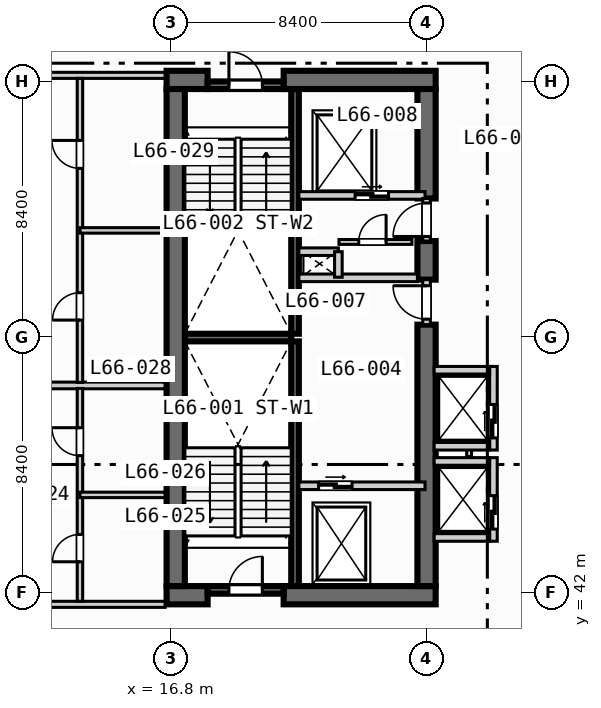
"""IFC4 building model, lengths in metres.
Left out: names, types, materials, properties, quantities, classifications, styles, units other than length and angle.
Written with IfcOpenShell. Run it as: python <this file> out.ifc"""

import sys

from ifc_helpers import new_model, si_unit, direction, frame, frame_2d, origin, place, context, subcontext, project, spatial, rectangle, extrude, element, fill, save


model = new_model("IFC4")
c1 = context("Model", 3, precision=1e-05, world=origin(), true_north=direction((0.0, 1.0)))
c2 = subcontext(c1, "Body", "Model", "MODEL_VIEW")
j1 = project(units=[si_unit("LENGTHUNIT", "METRE"), si_unit("PLANEANGLEUNIT", "RADIAN")], contexts=[c1])
p1 = place(None, origin())
s1 = spatial("IfcSite", under=j1, at=p1, CompositionType="ELEMENT")
p2 = place(p1, origin())
s2 = spatial("IfcBuilding", under=s1, at=p2, CompositionType="ELEMENT")
p3 = place(p2, frame((0.0, 0.0, 267.5)))
s3 = spatial("IfcBuildingStorey", under=s2, at=p3, CompositionType="ELEMENT", Elevation=267.5)
for number, where, z_axis, x_axis in (
    (1, (20.875, 42.2, 0.0), (0.0, 0.0, 1.0), (0.0, 1.0, 0.0)),
    (2, (20.875, 50.5, 0.0), (0.0, 0.0, 1.0), (0.0, 1.0, 0.0)),
):
    element("IfcWall", number, at=place(p3, frame(where, z_axis=z_axis, x_axis=x_axis)), inside=s3, PredefinedType="SOLIDWALL", context=c2, shape_type="SweptSolid", body=[
        extrude(rectangle(XDim=8.05, YDim=0.25, at=frame_2d((4.025, 0.0))), origin(), (0.0, 0.0, 1.0), 3.47),
    ])
p4 = place(p3, frame((17.25, 50.375, 0.0), z_axis=(0.0, 0.0, 1.0), x_axis=(1.0, 0.0, 0.0)))
e3 = element("IfcWall", 3, at=p4, inside=s3, PredefinedType="SOLIDWALL", context=c2, shape_type="SweptSolid", body=[
    extrude(rectangle(XDim=3.5, YDim=0.25, at=frame_2d((1.75, 0.0))), origin(), (0.0, 0.0, 1.0), 3.47),
])
p5 = place(p3, frame((16.65, 41.9, 0.0), z_axis=(0.0, 0.0, 1.0), x_axis=(1.0, 0.0, 0.0)))
e4 = element("IfcWall", 4, at=p5, inside=s3, PredefinedType="SHEAR", context=c2, shape_type="SweptSolid", body=[
    extrude(rectangle(XDim=1.35, YDim=0.6, at=frame_2d((0.675, 0.0))), origin(), (0.0, 0.0, 1.0), 3.47),
])
p6 = place(p3, frame((20.5, 41.9, 0.0), z_axis=(0.0, 0.0, 1.0), x_axis=(1.0, 0.0, 0.0)))
e5 = element("IfcWall", 5, at=p6, inside=s3, PredefinedType="SHEAR", context=c2, shape_type="SweptSolid", body=[
    extrude(rectangle(XDim=5.0, YDim=0.6, at=frame_2d((2.5, 0.0))), origin(), (0.0, 0.0, 1.0), 3.47),
])
p7 = place(p3, frame((16.65, 58.85, 0.0), z_axis=(0.0, 0.0, 1.0), x_axis=(1.0, 0.0, 0.0)))
e6 = element("IfcWall", 6, at=p7, inside=s3, PredefinedType="SHEAR", context=c2, shape_type="SweptSolid", body=[
    extrude(rectangle(XDim=1.35, YDim=0.6, at=frame_2d((0.675, 0.0))), origin(), (0.0, 0.0, 1.0), 3.47),
])
p8 = place(p3, frame((20.5, 58.85, 0.0), z_axis=(0.0, 0.0, 1.0), x_axis=(1.0, 0.0, 0.0)))
e7 = element("IfcWall", 7, at=p8, inside=s3, PredefinedType="SHEAR", context=c2, shape_type="SweptSolid", body=[
    extrude(rectangle(XDim=5.0, YDim=0.6, at=frame_2d((2.5, 0.0))), origin(), (0.0, 0.0, 1.0), 3.47),
])
p9 = place(p3, frame((16.95, 42.2, 0.0), z_axis=(0.0, 0.0, 1.0), x_axis=(0.0, 1.0, 0.0)))
e8 = element("IfcWall", 8, at=p9, inside=s3, PredefinedType="SHEAR", context=c2, shape_type="SweptSolid", body=[
    extrude(rectangle(XDim=16.35, YDim=0.6, at=frame_2d((8.175, 0.0))), origin(), (0.0, 0.0, 1.0), 3.47),
])
p10 = place(p3, frame((25.2, 42.2, 0.0), z_axis=(0.0, 0.0, 1.0), x_axis=(0.0, 1.0, 0.0)))
e9 = element("IfcWall", 9, at=p10, inside=s3, PredefinedType="SHEAR", context=c2, shape_type="SweptSolid", body=[
    extrude(rectangle(XDim=8.6, YDim=0.6, at=frame_2d((4.3, 0.0))), origin(), (0.0, 0.0, 1.0), 3.47),
])
p11 = place(p3, frame((25.2, 52.28, 0.0), z_axis=(0.0, 0.0, 1.0), x_axis=(0.0, 1.0, 0.0)))
e10 = element("IfcWall", 10, at=p11, inside=s3, PredefinedType="SHEAR", context=c2, shape_type="SweptSolid", body=[
    extrude(rectangle(XDim=1.27, YDim=0.6, at=frame_2d((0.635, 0.0))), origin(), (0.0, 0.0, 1.0), 3.47),
])
p12 = place(p3, frame((25.2, 54.95, 0.0), z_axis=(0.0, 0.0, 1.0), x_axis=(0.0, 1.0, 0.0)))
e11 = element("IfcWall", 11, at=p12, inside=s3, PredefinedType="SHEAR", context=c2, shape_type="SweptSolid", body=[
    extrude(rectangle(XDim=3.6, YDim=0.6, at=frame_2d((1.8, 0.0))), origin(), (0.0, 0.0, 1.0), 3.47),
])
p13 = place(p3, frame((18.0, 42.075, 0.0), z_axis=(0.0, 0.0, 1.0), x_axis=(1.0, 0.0, 0.0)))
e12 = element("IfcWall", 12, at=p13, inside=s3, PredefinedType="SOLIDWALL", context=c2, shape_type="SweptSolid", body=[
    extrude(rectangle(XDim=2.5, YDim=0.25, at=frame_2d((1.25, 0.0))), origin(), (0.0, 0.0, 1.0), 3.47),
])
p14 = place(p13, frame((0.7, 0.0, 0.0)))
e13 = element("IfcOpeningElement", 13, at=p14, cuts=e12, PredefinedType="OPENING", context=c2, shape_type="SweptSolid", body=[
    extrude(rectangle(XDim=1.1, YDim=2.15, at=frame_2d((0.55, 1.075))), frame((0.0, 0.135, 0.0), z_axis=(0.0, -1.0, 0.0), x_axis=(1.0, 0.0, 0.0)), (0.0, 0.0, 1.0), 0.27),
])
p15 = place(p3, frame((18.0, 58.675, 0.0), z_axis=(0.0, 0.0, 1.0), x_axis=(1.0, 0.0, 0.0)))
e14 = element("IfcWall", 14, at=p15, inside=s3, PredefinedType="SOLIDWALL", context=c2, shape_type="SweptSolid", body=[
    extrude(rectangle(XDim=2.5, YDim=0.25, at=frame_2d((1.25, 0.0))), origin(), (0.0, 0.0, 1.0), 3.47),
])
p16 = place(p15, frame((0.7, 0.0, 0.0)))
e15 = element("IfcOpeningElement", 15, at=p16, cuts=e14, PredefinedType="OPENING", context=c2, shape_type="SweptSolid", body=[
    extrude(rectangle(XDim=1.1, YDim=2.15, at=frame_2d((0.55, 1.075))), frame((0.0, 0.135, 0.0), z_axis=(0.0, -1.0, 0.0), x_axis=(1.0, 0.0, 0.0)), (0.0, 0.0, 1.0), 0.27),
])
p17 = place(p3, frame((21.0, 45.5, 0.0), z_axis=(0.0, 0.0, 1.0), x_axis=(1.0, 0.0, 0.0)))
e16 = element("IfcWall", 16, at=p17, inside=s3, PredefinedType="SOLIDWALL", context=c2, shape_type="SweptSolid", body=[
    extrude(rectangle(XDim=4.15, YDim=0.25, at=frame_2d((2.075, 0.0))), origin(), (0.0, 0.0, 1.0), 3.47),
])
p18 = place(p17, frame((0.65, 0.0, 0.0)))
e17 = element("IfcOpeningElement", 17, at=p18, cuts=e16, PredefinedType="OPENING", context=c2, shape_type="SweptSolid", body=[
    extrude(rectangle(XDim=1.1, YDim=2.15, at=frame_2d((0.55, 1.075))), frame((0.0, 0.135, 0.0), z_axis=(0.0, -1.0, 0.0), x_axis=(1.0, 0.0, 0.0)), (0.0, 0.0, 1.0), 0.27),
])
p19 = place(p3, frame((25.2, 50.8, 0.0), z_axis=(0.0, 0.0, 1.0), x_axis=(0.0, 1.0, 0.0)))
e18 = element("IfcWall", 18, at=p19, inside=s3, PredefinedType="SOLIDWALL", context=c2, shape_type="SweptSolid", body=[
    extrude(rectangle(XDim=1.48, YDim=0.25, at=frame_2d((0.74, 0.0))), origin(), (0.0, 0.0, 1.0), 3.47),
])
p20 = place(p19, frame((0.18, 0.0, 0.0)))
e19 = element("IfcOpeningElement", 19, at=p20, cuts=e18, PredefinedType="OPENING", context=c2, shape_type="SweptSolid", body=[
    extrude(rectangle(XDim=1.1, YDim=2.15, at=frame_2d((0.55, 1.075))), frame((0.0, 0.135, 0.0), z_axis=(0.0, -1.0, 0.0), x_axis=(1.0, 0.0, 0.0)), (0.0, 0.0, 1.0), 0.27),
])
p21 = place(p3, frame((21.0, 52.34, 0.0), z_axis=(0.0, 0.0, 1.0), x_axis=(1.0, 0.0, 0.0)))
e20 = element("IfcWall", 20, at=p21, inside=s3, PredefinedType="SOLIDWALL", context=c2, shape_type="SweptSolid", body=[
    extrude(rectangle(XDim=3.9, YDim=0.25, at=frame_2d((1.95, 0.0))), origin(), (0.0, 0.0, 1.0), 3.47),
])
p22 = place(p3, frame((21.0, 55.05, 0.0), z_axis=(0.0, 0.0, 1.0), x_axis=(1.0, 0.0, 0.0)))
e21 = element("IfcWall", 21, at=p22, inside=s3, PredefinedType="SOLIDWALL", context=c2, shape_type="SweptSolid", body=[
    extrude(rectangle(XDim=4.15, YDim=0.25, at=frame_2d((2.075, 0.0))), origin(), (0.0, 0.0, 1.0), 3.47),
])
p23 = place(p22, frame((1.85, 0.0, 0.0)))
e22 = element("IfcOpeningElement", 22, at=p23, cuts=e21, PredefinedType="OPENING", context=c2, shape_type="SweptSolid", body=[
    extrude(rectangle(XDim=1.1, YDim=2.15, at=frame_2d((0.55, 1.075))), frame((0.0, 0.135, 0.0), z_axis=(0.0, -1.0, 0.0), x_axis=(1.0, 0.0, 0.0)), (0.0, 0.0, 1.0), 0.27),
])
p24 = place(p3, frame((25.2, 53.55, 0.0), z_axis=(0.0, 0.0, 1.0), x_axis=(0.0, 1.0, 0.0)))
e23 = element("IfcWall", 23, at=p24, inside=s3, PredefinedType="SOLIDWALL", context=c2, shape_type="SweptSolid", body=[
    extrude(rectangle(XDim=1.4, YDim=0.25, at=frame_2d((0.7, 0.0))), origin(), (0.0, 0.0, 1.0), 3.47),
])
p25 = place(p24, frame((0.15, 0.0, 0.0)))
e24 = element("IfcOpeningElement", 24, at=p25, cuts=e23, PredefinedType="OPENING", context=c2, shape_type="SweptSolid", body=[
    extrude(rectangle(XDim=1.1, YDim=2.15, at=frame_2d((0.55, 1.075))), frame((0.0, 0.135, 0.0), z_axis=(0.0, -1.0, 0.0), x_axis=(1.0, 0.0, 0.0)), (0.0, 0.0, 1.0), 0.27),
])
p26 = place(p3, frame((21.0, 53.2, 0.0), z_axis=(0.0, 0.0, 1.0), x_axis=(1.0, 0.0, 0.0)))
e25 = element("IfcWall", 25, at=p26, inside=s3, PredefinedType="SOLIDWALL", context=c2, shape_type="SweptSolid", body=[
    extrude(rectangle(XDim=1.3, YDim=0.25, at=frame_2d((0.65, 0.0))), origin(), (0.0, 0.0, 1.0), 3.47),
])
p27 = place(p3, frame((22.3, 52.36, 0.0), z_axis=(0.0, 0.0, 1.0), x_axis=(0.0, 1.0, 0.0)))
e26 = element("IfcWall", 26, at=p27, inside=s3, PredefinedType="SOLIDWALL", context=c2, shape_type="SweptSolid", body=[
    extrude(rectangle(XDim=0.84, YDim=0.25, at=frame_2d((0.42, 0.0))), origin(), (0.0, 0.0, 1.0), 3.47),
])
p28 = place(p3, frame((22.32, 53.52, 0.0), z_axis=(0.0, 0.0, 1.0), x_axis=(1.0, 0.0, 0.0)))
e27 = element("IfcWall", 27, at=p28, inside=s3, PredefinedType="PARTITIONING", context=c2, shape_type="SweptSolid", body=[
    extrude(rectangle(XDim=2.4, YDim=0.16, at=frame_2d((1.2, 0.0))), origin(), (0.0, 0.0, 1.0), 3.47),
])
p29 = place(p28, frame((0.65, 0.0, 0.0)))
e28 = element("IfcOpeningElement", 28, at=p29, cuts=e27, PredefinedType="OPENING", context=c2, shape_type="SweptSolid", body=[
    extrude(rectangle(XDim=0.9, YDim=2.1, at=frame_2d((0.45, 1.05))), frame((0.0, 0.09, 0.0), z_axis=(0.0, -1.0, 0.0), x_axis=(1.0, 0.0, 0.0)), (0.0, 0.0, 1.0), 0.18),
])
p30 = place(p3, frame((27.4, 43.675, 0.0), z_axis=(0.0, 0.0, 1.0), x_axis=(0.0, 1.0, 0.0)))
e29 = element("IfcWall", 29, at=p30, inside=s3, PredefinedType="SOLIDWALL", context=c2, shape_type="SweptSolid", body=[
    extrude(rectangle(XDim=2.75, YDim=0.25, at=frame_2d((1.375, 0.0))), origin(), (0.0, 0.0, 1.0), 3.47),
])
p31 = place(p30, frame((0.4, 0.0, 0.0)))
e30 = element("IfcOpeningElement", 30, at=p31, cuts=e29, PredefinedType="OPENING", context=c2, shape_type="SweptSolid", body=[
    extrude(rectangle(XDim=1.1, YDim=2.15, at=frame_2d((0.55, 1.075))), frame((0.0, 0.135, 0.0), z_axis=(0.0, -1.0, 0.0), x_axis=(1.0, 0.0, 0.0)), (0.0, 0.0, 1.0), 0.27),
])
for number, where, z_axis, x_axis in (
    (31, (25.45, 43.8, 0.0), (0.0, 0.0, 1.0), (1.0, 0.0, 0.0)),
    (32, (25.45, 46.3, 0.0), (0.0, 0.0, 1.0), (1.0, 0.0, 0.0)),
):
    element("IfcWall", number, at=place(p3, frame(where, z_axis=z_axis, x_axis=x_axis)), inside=s3, PredefinedType="SOLIDWALL", context=c2, shape_type="SweptSolid", body=[
        extrude(rectangle(XDim=1.825, YDim=0.25, at=frame_2d((0.913, 0.0))), origin(), (0.0, 0.0, 1.0), 3.47),
    ])
p32 = place(p3, frame((26.6, 46.46, 0.0), z_axis=(0.0, 0.0, 1.0), x_axis=(0.0, 1.0, 0.0)))
e33 = element("IfcWall", 33, at=p32, inside=s3, PredefinedType="PARTITIONING", context=c2, shape_type="SweptSolid", body=[
    extrude(rectangle(XDim=0.88, YDim=0.16, at=frame_2d((0.44, 0.0))), origin(), (0.0, 0.0, 1.0), 3.47),
])
p33 = place(p3, frame((27.4, 46.675, 0.0), z_axis=(0.0, 0.0, 1.0), x_axis=(0.0, 1.0, 0.0)))
e34 = element("IfcWall", 34, at=p33, inside=s3, PredefinedType="SOLIDWALL", context=c2, shape_type="SweptSolid", body=[
    extrude(rectangle(XDim=2.75, YDim=0.25, at=frame_2d((1.375, 0.0))), origin(), (0.0, 0.0, 1.0), 3.47),
])
p34 = place(p33, frame((0.4, 0.0, 0.0)))
e35 = element("IfcOpeningElement", 35, at=p34, cuts=e34, PredefinedType="OPENING", context=c2, shape_type="SweptSolid", body=[
    extrude(rectangle(XDim=1.1, YDim=2.15, at=frame_2d((0.55, 1.075))), frame((0.0, 0.135, 0.0), z_axis=(0.0, -1.0, 0.0), x_axis=(1.0, 0.0, 0.0)), (0.0, 0.0, 1.0), 0.27),
])
for number, where, z_axis, x_axis in (
    (36, (25.45, 46.8, 0.0), (0.0, 0.0, 1.0), (1.0, 0.0, 0.0)),
    (37, (25.45, 49.3, 0.0), (0.0, 0.0, 1.0), (1.0, 0.0, 0.0)),
):
    element("IfcWall", number, at=place(p3, frame(where, z_axis=z_axis, x_axis=x_axis)), inside=s3, PredefinedType="SOLIDWALL", context=c2, shape_type="SweptSolid", body=[
        extrude(rectangle(XDim=1.825, YDim=0.25, at=frame_2d((0.913, 0.0))), origin(), (0.0, 0.0, 1.0), 3.47),
    ])
p35 = place(p3, frame((8.65, 41.6, 0.0), z_axis=(0.0, 0.0, 1.0), x_axis=(1.0, 0.0, 0.0)))
e38 = element("IfcWall", 38, at=p35, inside=s3, PredefinedType="PARTITIONING", context=c2, shape_type="SweptSolid", body=[
    extrude(rectangle(XDim=7.95, YDim=0.2, at=frame_2d((3.975, 0.0))), origin(), (0.0, 0.0, 1.0), 3.47),
])
p36 = place(p35, frame((2.0, 0.0, 0.0)))
e39 = element("IfcOpeningElement", 39, at=p36, cuts=e38, PredefinedType="OPENING", context=c2, shape_type="SweptSolid", body=[
    extrude(rectangle(XDim=1.0, YDim=2.15, at=frame_2d((0.5, 1.075))), frame((0.0, 0.11, 0.0), z_axis=(0.0, -1.0, 0.0), x_axis=(1.0, 0.0, 0.0)), (0.0, 0.0, 1.0), 0.22),
])
p37 = place(p3, frame((8.65, 59.0, 0.0), z_axis=(0.0, 0.0, 1.0), x_axis=(1.0, 0.0, 0.0)))
e40 = element("IfcWall", 40, at=p37, inside=s3, PredefinedType="PARTITIONING", context=c2, shape_type="SweptSolid", body=[
    extrude(rectangle(XDim=7.95, YDim=0.2, at=frame_2d((3.975, 0.0))), origin(), (0.0, 0.0, 1.0), 2.82),
])
p38 = place(p37, frame((2.0, 0.0, 0.0)))
e41 = element("IfcOpeningElement", 41, at=p38, cuts=e40, PredefinedType="OPENING", context=c2, shape_type="SweptSolid", body=[
    extrude(rectangle(XDim=1.0, YDim=2.15, at=frame_2d((0.5, 1.075))), frame((0.0, 0.11, 0.0), z_axis=(0.0, -1.0, 0.0), x_axis=(1.0, 0.0, 0.0)), (0.0, 0.0, 1.0), 0.22),
])
p39 = place(p3, frame((8.65, 48.8, 0.0), z_axis=(0.0, 0.0, 1.0), x_axis=(1.0, 0.0, 0.0)))
e42 = element("IfcWall", 42, at=p39, inside=s3, PredefinedType="PARTITIONING", context=c2, shape_type="SweptSolid", body=[
    extrude(rectangle(XDim=7.95, YDim=0.22, at=frame_2d((3.975, 0.0))), origin(), (0.0, 0.0, 1.0), 3.47),
])
p40 = place(p3, frame((13.8, 41.7, 0.0), z_axis=(0.0, 0.0, 1.0), x_axis=(0.0, 1.0, 0.0)))
e43 = element("IfcWall", 43, at=p40, inside=s3, PredefinedType="PLUMBINGWALL", context=c2, shape_type="SweptSolid", body=[
    extrude(rectangle(XDim=7.0, YDim=0.18, at=frame_2d((3.5, 0.0))), origin(), (0.0, 0.0, 1.0), 3.47),
])
p41 = place(p40, frame((1.3, 0.0, 0.0)))
e44 = element("IfcOpeningElement", 44, at=p41, cuts=e43, PredefinedType="OPENING", context=c2, shape_type="SweptSolid", body=[
    extrude(rectangle(XDim=0.9, YDim=2.1, at=frame_2d((0.45, 1.05))), frame((0.0, 0.1, 0.0), z_axis=(0.0, -1.0, 0.0), x_axis=(1.0, 0.0, 0.0)), (0.0, 0.0, 1.0), 0.2),
])
p42 = place(p40, frame((4.79, 0.0, 0.0)))
e45 = element("IfcOpeningElement", 45, at=p42, cuts=e43, PredefinedType="OPENING", context=c2, shape_type="SweptSolid", body=[
    extrude(rectangle(XDim=0.92, YDim=2.1, at=frame_2d((0.46, 1.05))), frame((0.0, 0.1, 0.0), z_axis=(0.0, -1.0, 0.0), x_axis=(1.0, 0.0, 0.0)), (0.0, 0.0, 1.0), 0.2),
])
p43 = place(p3, frame((13.8, 45.2, 0.0), z_axis=(0.0, 0.0, 1.0), x_axis=(1.0, 0.0, 0.0)))
e46 = element("IfcWall", 46, at=p43, inside=s3, PredefinedType="PLUMBINGWALL", context=c2, shape_type="SweptSolid", body=[
    extrude(rectangle(XDim=2.8, YDim=0.18, at=frame_2d((1.4, 0.0))), origin(), (0.0, 0.0, 1.0), 3.47),
])
p44 = place(p3, frame((13.8, 48.9, 0.0), z_axis=(0.0, 0.0, 1.0), x_axis=(0.0, 1.0, 0.0)))
e47 = element("IfcWall", 47, at=p44, inside=s3, PredefinedType="PLUMBINGWALL", context=c2, shape_type="SweptSolid", body=[
    extrude(rectangle(XDim=10.0, YDim=0.18, at=frame_2d((5.0, 0.0))), origin(), (0.0, 0.0, 1.0), 3.47),
])
p45 = place(p44, frame((2.05, 0.0, 0.0)))
e48 = element("IfcOpeningElement", 48, at=p45, cuts=e47, PredefinedType="OPENING", context=c2, shape_type="SweptSolid", body=[
    extrude(rectangle(XDim=0.9, YDim=2.1, at=frame_2d((0.45, 1.05))), frame((0.0, 0.1, 0.0), z_axis=(0.0, -1.0, 0.0), x_axis=(1.0, 0.0, 0.0)), (0.0, 0.0, 1.0), 0.2),
])
p46 = place(p44, frame((7.04, 0.0, 0.0)))
e49 = element("IfcOpeningElement", 49, at=p46, cuts=e47, PredefinedType="OPENING", context=c2, shape_type="SweptSolid", body=[
    extrude(rectangle(XDim=0.92, YDim=2.1, at=frame_2d((0.46, 1.05))), frame((0.0, 0.1, 0.0), z_axis=(0.0, -1.0, 0.0), x_axis=(1.0, 0.0, 0.0)), (0.0, 0.0, 1.0), 0.2),
])
p47 = place(p3, frame((13.8, 53.9, 0.0), z_axis=(0.0, 0.0, 1.0), x_axis=(1.0, 0.0, 0.0)))
e50 = element("IfcWall", 50, at=p47, inside=s3, PredefinedType="PLUMBINGWALL", context=c2, shape_type="SweptSolid", body=[
    extrude(rectangle(XDim=2.8, YDim=0.18, at=frame_2d((1.4, 0.0))), origin(), (0.0, 0.0, 1.0), 3.47),
])
p48 = place(p14, origin())
e51 = element("IfcDoor", 51, at=p48, inside=s3, OperationType="SINGLE_SWING_RIGHT", PredefinedType="DOOR", context=c2, shape_type="SweptSolid", body=[
    extrude(rectangle(XDim=1.1, YDim=2.15, at=frame_2d((0.55, 1.075))), frame((0.0, 0.025, 0.0), z_axis=(0.0, -1.0, 0.0), x_axis=(1.0, 0.0, 0.0)), (0.0, 0.0, 1.0), 0.05),
])
fill(e13, e51)
p49 = place(p16, origin())
e52 = element("IfcDoor", 52, at=p49, inside=s3, OperationType="SINGLE_SWING_LEFT", PredefinedType="DOOR", context=c2, shape_type="SweptSolid", body=[
    extrude(rectangle(XDim=1.1, YDim=2.15, at=frame_2d((0.55, 1.075))), frame((0.0, 0.025, 0.0), z_axis=(0.0, -1.0, 0.0), x_axis=(1.0, 0.0, 0.0)), (0.0, 0.0, 1.0), 0.05),
])
fill(e15, e52)
p50 = place(p18, origin())
e53 = element("IfcDoor", 53, at=p50, inside=s3, OperationType="SLIDING_TO_LEFT", PredefinedType="DOOR", context=c2, shape_type="SweptSolid", body=[
    extrude(rectangle(XDim=1.1, YDim=2.15, at=frame_2d((0.55, 1.075))), frame((0.0, 0.025, 0.0), z_axis=(0.0, -1.0, 0.0), x_axis=(1.0, 0.0, 0.0)), (0.0, 0.0, 1.0), 0.05),
])
fill(e17, e53)
p51 = place(p20, origin())
e54 = element("IfcDoor", 54, at=p51, inside=s3, OperationType="SINGLE_SWING_RIGHT", PredefinedType="DOOR", context=c2, shape_type="SweptSolid", body=[
    extrude(rectangle(XDim=1.1, YDim=2.15, at=frame_2d((0.55, 1.075))), frame((0.0, 0.025, 0.0), z_axis=(0.0, -1.0, 0.0), x_axis=(1.0, 0.0, 0.0)), (0.0, 0.0, 1.0), 0.05),
])
fill(e19, e54)
p52 = place(p23, origin())
e55 = element("IfcDoor", 55, at=p52, inside=s3, OperationType="SLIDING_TO_LEFT", PredefinedType="DOOR", context=c2, shape_type="SweptSolid", body=[
    extrude(rectangle(XDim=1.1, YDim=2.15, at=frame_2d((0.55, 1.075))), frame((0.0, 0.025, 0.0), z_axis=(0.0, -1.0, 0.0), x_axis=(1.0, 0.0, 0.0)), (0.0, 0.0, 1.0), 0.05),
])
fill(e22, e55)
p53 = place(p25, origin())
e56 = element("IfcDoor", 56, at=p53, inside=s3, OperationType="SINGLE_SWING_LEFT", PredefinedType="DOOR", context=c2, shape_type="SweptSolid", body=[
    extrude(rectangle(XDim=1.1, YDim=2.15, at=frame_2d((0.55, 1.075))), frame((0.0, 0.025, 0.0), z_axis=(0.0, -1.0, 0.0), x_axis=(1.0, 0.0, 0.0)), (0.0, 0.0, 1.0), 0.05),
])
fill(e24, e56)
p54 = place(p29, origin())
e57 = element("IfcDoor", 57, at=p54, inside=s3, OperationType="SINGLE_SWING_RIGHT", PredefinedType="DOOR", context=c2, shape_type="SweptSolid", body=[
    extrude(rectangle(XDim=0.9, YDim=2.1, at=frame_2d((0.45, 1.05))), frame((0.0, 0.025, 0.0), z_axis=(0.0, -1.0, 0.0), x_axis=(1.0, 0.0, 0.0)), (0.0, 0.0, 1.0), 0.05),
])
fill(e28, e57)
p55 = place(p31, origin())
e58 = element("IfcDoor", 58, at=p55, inside=s3, OperationType="SLIDING_TO_LEFT", PredefinedType="DOOR", context=c2, shape_type="SweptSolid", body=[
    extrude(rectangle(XDim=1.1, YDim=2.15, at=frame_2d((0.55, 1.075))), frame((0.0, 0.025, 0.0), z_axis=(0.0, -1.0, 0.0), x_axis=(1.0, 0.0, 0.0)), (0.0, 0.0, 1.0), 0.05),
])
fill(e30, e58)
p56 = place(p34, origin())
e59 = element("IfcDoor", 59, at=p56, inside=s3, OperationType="SLIDING_TO_LEFT", PredefinedType="DOOR", context=c2, shape_type="SweptSolid", body=[
    extrude(rectangle(XDim=1.1, YDim=2.15, at=frame_2d((0.55, 1.075))), frame((0.0, 0.025, 0.0), z_axis=(0.0, -1.0, 0.0), x_axis=(1.0, 0.0, 0.0)), (0.0, 0.0, 1.0), 0.05),
])
fill(e35, e59)
p57 = place(p41, origin())
e60 = element("IfcDoor", 60, at=p57, inside=s3, OperationType="SINGLE_SWING_LEFT", PredefinedType="DOOR", context=c2, shape_type="SweptSolid", body=[
    extrude(rectangle(XDim=0.9, YDim=2.1, at=frame_2d((0.45, 1.05))), frame((0.0, 0.025, 0.0), z_axis=(0.0, -1.0, 0.0), x_axis=(1.0, 0.0, 0.0)), (0.0, 0.0, 1.0), 0.05),
])
fill(e44, e60)
p58 = place(p42, origin())
e61 = element("IfcDoor", 61, at=p58, inside=s3, OperationType="SINGLE_SWING_RIGHT", PredefinedType="DOOR", context=c2, shape_type="SweptSolid", body=[
    extrude(rectangle(XDim=0.92, YDim=2.1, at=frame_2d((0.46, 1.05))), frame((0.0, 0.025, 0.0), z_axis=(0.0, -1.0, 0.0), x_axis=(1.0, 0.0, 0.0)), (0.0, 0.0, 1.0), 0.05),
])
fill(e45, e61)
p59 = place(p45, origin())
e62 = element("IfcDoor", 62, at=p59, inside=s3, OperationType="SINGLE_SWING_LEFT", PredefinedType="DOOR", context=c2, shape_type="SweptSolid", body=[
    extrude(rectangle(XDim=0.9, YDim=2.1, at=frame_2d((0.45, 1.05))), frame((0.0, 0.025, 0.0), z_axis=(0.0, -1.0, 0.0), x_axis=(1.0, 0.0, 0.0)), (0.0, 0.0, 1.0), 0.05),
])
fill(e48, e62)
p60 = place(p46, origin())
e63 = element("IfcDoor", 63, at=p60, inside=s3, OperationType="SINGLE_SWING_RIGHT", PredefinedType="DOOR", context=c2, shape_type="SweptSolid", body=[
    extrude(rectangle(XDim=0.92, YDim=2.1, at=frame_2d((0.46, 1.05))), frame((0.0, 0.025, 0.0), z_axis=(0.0, -1.0, 0.0), x_axis=(1.0, 0.0, 0.0)), (0.0, 0.0, 1.0), 0.05),
])
fill(e49, e63)
save(model, sys.argv[1])
